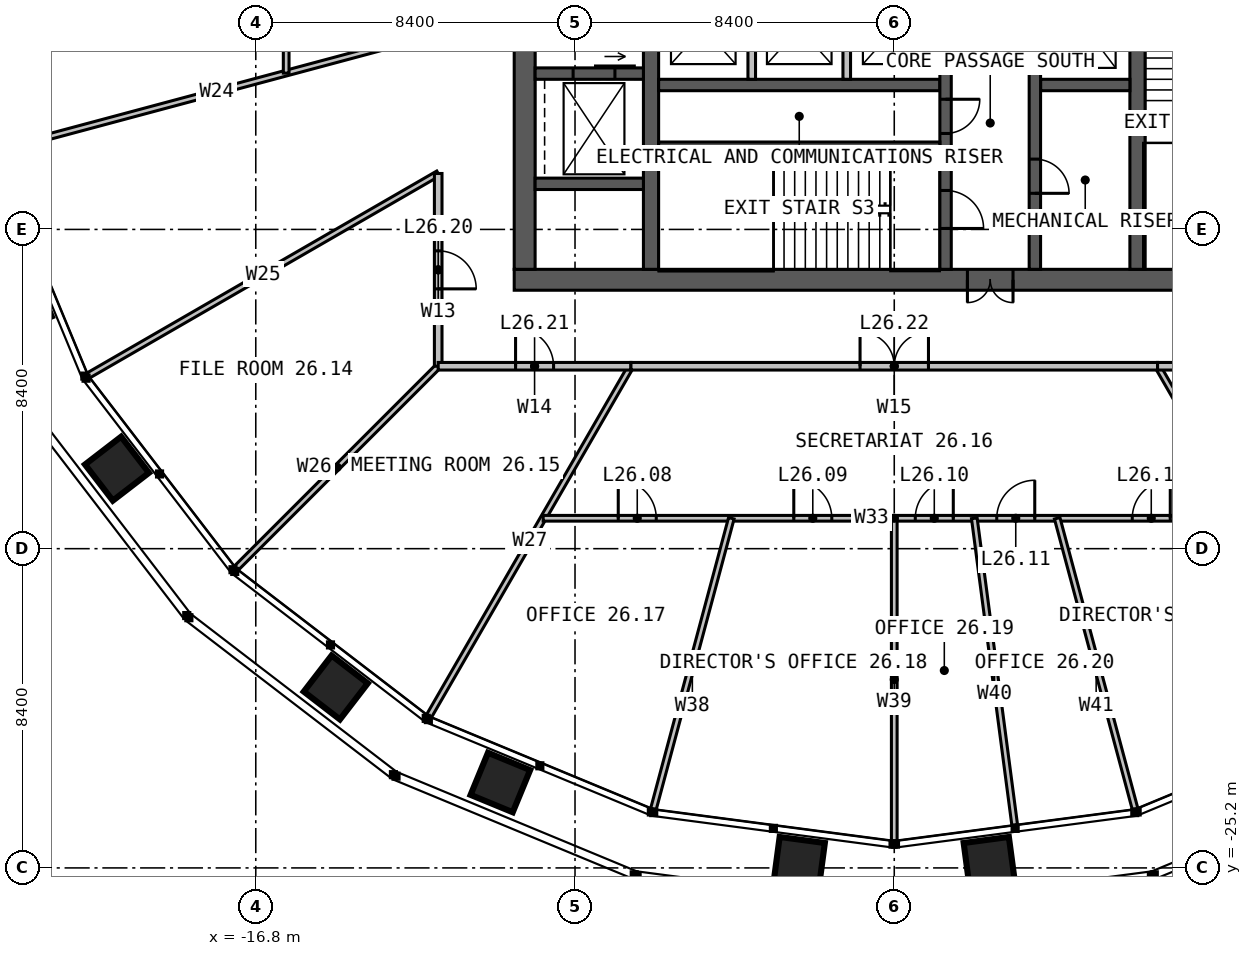
"""IFC4 building model, lengths in metres.
Left out: names, types, materials, properties, quantities, classifications, styles, units other than length and angle.
Written with IfcOpenShell. Run it as: python <this file> out.ifc"""

import sys

from ifc_helpers import new_model, si_unit, direction, frame, frame_2d, origin, place, context, subcontext, project, spatial, rectangle, extrude, element, fill, save


model = new_model("IFC4")
c1 = context("Model", 3, precision=1e-05, world=origin(), true_north=direction((0.0, 1.0)))
c2 = subcontext(c1, "Body", "Model", "MODEL_VIEW")
j1 = project(units=[si_unit("LENGTHUNIT", "METRE"), si_unit("PLANEANGLEUNIT", "RADIAN")], contexts=[c1])
p1 = place(None, origin())
s1 = spatial("IfcSite", under=j1, at=p1, CompositionType="ELEMENT")
p2 = place(p1, origin())
s2 = spatial("IfcBuilding", under=s1, at=p2, CompositionType="ELEMENT")
p3 = place(p2, frame((0.0, 0.0, 110.0)))
s3 = spatial("IfcBuildingStorey", under=s2, at=p3, CompositionType="ELEMENT", Elevation=110.0)
p4 = place(p3, frame((10.0, -9.725, 0.0), z_axis=(0.0, 0.0, 1.0), x_axis=(-1.0, 0.0, 0.0)))
e1 = element("IfcWall", 1, at=p4, inside=s3, PredefinedType="SOLIDWALL", context=c2, shape_type="SweptSolid", body=[
    extrude(rectangle(XDim=20.0, YDim=0.55, at=frame_2d((10.0, 0.0))), origin(), (0.0, 0.0, 1.0), 4.0),
])
p5 = place(p4, frame((6.875, 0.0, 0.0)))
e2 = element("IfcOpeningElement", 2, at=p5, cuts=e1, PredefinedType="OPENING", context=c2, shape_type="SweptSolid", body=[
    extrude(rectangle(XDim=1.2, YDim=2.2, at=frame_2d((0.6, 1.1))), frame((0.0, 0.285, 0.0), z_axis=(0.0, -1.0, 0.0), x_axis=(1.0, 0.0, 0.0)), (0.0, 0.0, 1.0), 0.57),
])
p6 = place(p3, frame((-9.725, 9.45, 0.0), z_axis=(0.0, 0.0, 1.0), x_axis=(0.0, -1.0, 0.0)))
e3 = element("IfcWall", 3, at=p6, inside=s3, PredefinedType="SOLIDWALL", context=c2, shape_type="SweptSolid", body=[
    extrude(rectangle(XDim=18.9, YDim=0.55, at=frame_2d((9.45, 0.0))), origin(), (0.0, 0.0, 1.0), 4.0),
])
p7 = place(p3, frame((-6.4, -9.45, 0.0), z_axis=(0.0, 0.0, 1.0), x_axis=(0.0, 1.0, 0.0)))
e4 = element("IfcWall", 4, at=p7, inside=s3, PredefinedType="SOLIDWALL", context=c2, shape_type="SweptSolid", body=[
    extrude(rectangle(XDim=18.9, YDim=0.4, at=frame_2d((9.45, 0.0))), origin(), (0.0, 0.0, 1.0), 4.0),
])
p8 = place(p7, frame((8.95, 0.0, 0.0)))
e5 = element("IfcOpeningElement", 5, at=p8, cuts=e4, PredefinedType="OPENING", context=c2, shape_type="SweptSolid", body=[
    extrude(rectangle(XDim=1.0, YDim=2.2, at=frame_2d((0.5, 1.1))), frame((0.0, 0.21, 0.0), z_axis=(0.0, -1.0, 0.0), x_axis=(1.0, 0.0, 0.0)), (0.0, 0.0, 1.0), 0.42),
])
p9 = place(p3, frame((6.4, 9.45, 0.0), z_axis=(0.0, 0.0, 1.0), x_axis=(0.0, -1.0, 0.0)))
e6 = element("IfcWall", 6, at=p9, inside=s3, PredefinedType="SOLIDWALL", context=c2, shape_type="SweptSolid", body=[
    extrude(rectangle(XDim=18.9, YDim=0.4, at=frame_2d((9.45, 0.0))), origin(), (0.0, 0.0, 1.0), 4.0),
])
p10 = place(p9, frame((8.95, 0.0, 0.0)))
e7 = element("IfcOpeningElement", 7, at=p10, cuts=e6, PredefinedType="OPENING", context=c2, shape_type="SweptSolid", body=[
    extrude(rectangle(XDim=1.0, YDim=2.2, at=frame_2d((0.5, 1.1))), frame((0.0, 0.21, 0.0), z_axis=(0.0, -1.0, 0.0), x_axis=(1.0, 0.0, 0.0)), (0.0, 0.0, 1.0), 0.42),
])
p11 = place(p3, frame((-6.2, -4.6, 0.0), z_axis=(0.0, 0.0, 1.0), x_axis=(1.0, 0.0, 0.0)))
e8 = element("IfcWall", 8, at=p11, inside=s3, PredefinedType="SOLIDWALL", context=c2, shape_type="SweptSolid", body=[
    extrude(rectangle(XDim=7.4, YDim=0.3, at=frame_2d((3.7, 0.0))), origin(), (0.0, 0.0, 1.0), 4.0),
])
p12 = place(p3, frame((3.85, -4.6, 0.0), z_axis=(0.0, 0.0, 1.0), x_axis=(1.0, 0.0, 0.0)))
e9 = element("IfcWall", 9, at=p12, inside=s3, PredefinedType="SOLIDWALL", context=c2, shape_type="SweptSolid", body=[
    extrude(rectangle(XDim=2.35, YDim=0.3, at=frame_2d((1.175, 0.0))), origin(), (0.0, 0.0, 1.0), 4.0),
])
p13 = place(p3, frame((1.35, -1.45, 0.0), z_axis=(0.0, 0.0, 1.0), x_axis=(0.0, -1.0, 0.0)))
e10 = element("IfcWall", 10, at=p13, inside=s3, PredefinedType="SOLIDWALL", context=c2, shape_type="SweptSolid", body=[
    extrude(rectangle(XDim=8.0, YDim=0.3, at=frame_2d((4.0, 0.0))), origin(), (0.0, 0.0, 1.0), 4.0),
])
p14 = place(p13, frame((5.925, 0.0, 0.0)))
e11 = element("IfcOpeningElement", 11, at=p14, cuts=e10, PredefinedType="OPENING", context=c2, shape_type="SweptSolid", body=[
    extrude(rectangle(XDim=1.0, YDim=2.2, at=frame_2d((0.5, 1.1))), frame((0.0, 0.16, 0.0), z_axis=(0.0, -1.0, 0.0), x_axis=(1.0, 0.0, 0.0)), (0.0, 0.0, 1.0), 0.32),
])
p15 = place(p13, frame((3.525, 0.0, 0.0)))
e12 = element("IfcOpeningElement", 12, at=p15, cuts=e10, PredefinedType="OPENING", context=c2, shape_type="SweptSolid", body=[
    extrude(rectangle(XDim=0.9, YDim=2.2, at=frame_2d((0.45, 1.1))), frame((0.0, 0.16, 0.0), z_axis=(0.0, -1.0, 0.0), x_axis=(1.0, 0.0, 0.0)), (0.0, 0.0, 1.0), 0.32),
])
p16 = place(p3, frame((3.7, -1.45, 0.0), z_axis=(0.0, 0.0, 1.0), x_axis=(0.0, -1.0, 0.0)))
e13 = element("IfcWall", 13, at=p16, inside=s3, PredefinedType="SOLIDWALL", context=c2, shape_type="SweptSolid", body=[
    extrude(rectangle(XDim=8.0, YDim=0.3, at=frame_2d((4.0, 0.0))), origin(), (0.0, 0.0, 1.0), 4.0),
])
p17 = place(p16, frame((5.1, 0.0, 0.0)))
e14 = element("IfcOpeningElement", 14, at=p17, cuts=e13, PredefinedType="OPENING", context=c2, shape_type="SweptSolid", body=[
    extrude(rectangle(XDim=0.9, YDim=2.2, at=frame_2d((0.45, 1.1))), frame((0.0, 0.16, 0.0), z_axis=(0.0, -1.0, 0.0), x_axis=(1.0, 0.0, 0.0)), (0.0, 0.0, 1.0), 0.32),
])
p18 = place(p3, frame((-6.2, -6.2, 0.0), z_axis=(0.0, 0.0, 1.0), x_axis=(1.0, 0.0, 0.0)))
e15 = element("IfcWall", 15, at=p18, inside=s3, PredefinedType="SOLIDWALL", context=c2, shape_type="SweptSolid", body=[
    extrude(rectangle(XDim=7.4, YDim=0.2, at=frame_2d((3.7, 0.0))), origin(), (0.0, 0.0, 1.0), 4.0),
])
p19 = place(p3, frame((-9.45, -4.3, 0.0), z_axis=(0.0, 0.0, 1.0), x_axis=(1.0, 0.0, 0.0)))
e16 = element("IfcWall", 16, at=p19, inside=s3, PredefinedType="SOLIDWALL", context=c2, shape_type="SweptSolid", body=[
    extrude(rectangle(XDim=2.85, YDim=0.3, at=frame_2d((1.425, 0.0))), origin(), (0.0, 0.0, 1.0), 4.0),
])
p20 = place(p19, frame((1.0, 0.0, 0.0)))
e17 = element("IfcOpeningElement", 17, at=p20, cuts=e16, PredefinedType="OPENING", context=c2, shape_type="SweptSolid", body=[
    extrude(rectangle(XDim=1.1, YDim=2.2, at=frame_2d((0.55, 1.1))), frame((0.0, 0.16, 0.0), z_axis=(0.0, -1.0, 0.0), x_axis=(1.0, 0.0, 0.0)), (0.0, 0.0, 1.0), 0.32),
])
p21 = place(p3, frame((-9.45, -7.2, 0.0), z_axis=(0.0, 0.0, 1.0), x_axis=(1.0, 0.0, 0.0)))
e18 = element("IfcWall", 18, at=p21, inside=s3, PredefinedType="SOLIDWALL", context=c2, shape_type="SweptSolid", body=[
    extrude(rectangle(XDim=2.85, YDim=0.3, at=frame_2d((1.425, 0.0))), origin(), (0.0, 0.0, 1.0), 4.0),
])
for number, where, z_axis, x_axis in (
    (19, (-3.75, -1.75, 0.0), (0.0, 0.0, 1.0), (0.0, -1.0, 0.0)),
    (20, (-1.25, -1.75, 0.0), (0.0, 0.0, 1.0), (0.0, -1.0, 0.0)),
):
    element("IfcWall", number, at=place(p3, frame(where, z_axis=z_axis, x_axis=x_axis)), inside=s3, PredefinedType="SOLIDWALL", context=c2, shape_type="SweptSolid", body=[
        extrude(rectangle(XDim=2.7, YDim=0.2, at=frame_2d((1.35, 0.0))), origin(), (0.0, 0.0, 1.0), 3.75),
    ])
p22 = place(p3, frame((-12.0, -3.215, 0.0), z_axis=(0.0, 0.0, 1.0), x_axis=(-0.965926913807, -0.258814986396, 0.0)))
e21 = element("IfcWall", 21, at=p22, inside=s3, PredefinedType="PARTITIONING", context=c2, shape_type="SweptSolid", body=[
    extrude(rectangle(XDim=12.064, YDim=0.15, at=frame_2d((6.032, 0.0))), origin(), (0.0, 0.0, 1.0), 2.79),
])
p23 = place(p3, frame((-12.0, -6.928, 0.0), z_axis=(0.0, 0.0, 1.0), x_axis=(-0.866024197053, -0.500002090115, 0.0)))
e22 = element("IfcWall", 22, at=p23, inside=s3, PredefinedType="PARTITIONING", context=c2, shape_type="SweptSolid", body=[
    extrude(rectangle(XDim=10.631, YDim=0.15, at=frame_2d((5.315, 0.0))), origin(), (0.0, 0.0, 1.0), 2.79),
])
p24 = place(p3, frame((-12.0, -12.0, 0.0), z_axis=(0.0, 0.0, 1.0), x_axis=(-0.707106781187, -0.707106781187, 0.0)))
e23 = element("IfcWall", 23, at=p24, inside=s3, PredefinedType="PARTITIONING", context=c2, shape_type="SweptSolid", body=[
    extrude(rectangle(XDim=7.517, YDim=0.15, at=frame_2d((3.758, 0.0))), origin(), (0.0, 0.0, 1.0), 2.79),
])
for number, where, z_axis, x_axis in (
    (24, (-6.928, -12.0, 0.0), (0.0, 0.0, 1.0), (-0.5, -0.866, 0.0)),
    (25, (6.928, -12.0, 0.0), (0.0, 0.0, 1.0), (0.5, -0.866, 0.0)),
):
    element("IfcWall", number, at=place(p3, frame(where, z_axis=z_axis, x_axis=x_axis)), inside=s3, PredefinedType="PARTITIONING", context=c2, shape_type="SweptSolid", body=[
        extrude(rectangle(XDim=10.631, YDim=0.15, at=frame_2d((5.315, 0.0))), origin(), (0.0, 0.0, 1.0), 2.79),
    ])
p25 = place(p3, frame((-16.0, 9.238, 0.0), z_axis=(0.0, 0.0, 1.0), x_axis=(0.0, -1.0, 0.0)))
e26 = element("IfcWall", 26, at=p25, inside=s3, PredefinedType="PARTITIONING", context=c2, shape_type="SweptSolid", body=[
    extrude(rectangle(XDim=13.525, YDim=0.15, at=frame_2d((6.762, 0.0))), origin(), (0.0, 0.0, 1.0), 2.79),
])
p26 = place(p25, frame((1.975, 0.0, 0.0)))
e27 = element("IfcOpeningElement", 27, at=p26, cuts=e26, PredefinedType="OPENING", context=c2, shape_type="SweptSolid", body=[
    extrude(rectangle(XDim=1.0, YDim=2.2, at=frame_2d((0.5, 1.1))), frame((0.0, 0.085, 0.0), z_axis=(0.0, -1.0, 0.0), x_axis=(1.0, 0.0, 0.0)), (0.0, 0.0, 1.0), 0.17),
])
p27 = place(p25, frame((6.594, 0.0, 0.0)))
e28 = element("IfcOpeningElement", 28, at=p27, cuts=e26, PredefinedType="OPENING", context=c2, shape_type="SweptSolid", body=[
    extrude(rectangle(XDim=1.0, YDim=2.2, at=frame_2d((0.5, 1.1))), frame((0.0, 0.085, 0.0), z_axis=(0.0, -1.0, 0.0), x_axis=(1.0, 0.0, 0.0)), (0.0, 0.0, 1.0), 0.17),
])
p28 = place(p25, frame((10.881, 0.0, 0.0)))
e29 = element("IfcOpeningElement", 29, at=p28, cuts=e26, PredefinedType="OPENING", context=c2, shape_type="SweptSolid", body=[
    extrude(rectangle(XDim=1.0, YDim=2.2, at=frame_2d((0.5, 1.1))), frame((0.0, 0.085, 0.0), z_axis=(0.0, -1.0, 0.0), x_axis=(1.0, 0.0, 0.0)), (0.0, 0.0, 1.0), 0.17),
])
p29 = place(p3, frame((-12.0, -6.928, 0.0), z_axis=(0.0, 0.0, 1.0), x_axis=(0.0, -1.0, 0.0)))
e30 = element("IfcWall", 30, at=p29, inside=s3, PredefinedType="PARTITIONING", context=c2, shape_type="SweptSolid", body=[
    extrude(rectangle(XDim=5.072, YDim=0.2, at=frame_2d((2.536, 0.0))), origin(), (0.0, 0.0, 1.0), 3.8),
])
p30 = place(p29, frame((2.036, 0.0, 0.0)))
e31 = element("IfcOpeningElement", 31, at=p30, cuts=e30, PredefinedType="OPENING", context=c2, shape_type="SweptSolid", body=[
    extrude(rectangle(XDim=1.0, YDim=2.2, at=frame_2d((0.5, 1.1))), frame((0.0, 0.11, 0.0), z_axis=(0.0, -1.0, 0.0), x_axis=(1.0, 0.0, 0.0)), (0.0, 0.0, 1.0), 0.22),
])
p31 = place(p3, frame((-12.0, -12.0, 0.0), z_axis=(0.0, 0.0, 1.0), x_axis=(1.0, 0.0, 0.0)))
e32 = element("IfcWall", 32, at=p31, inside=s3, PredefinedType="PARTITIONING", context=c2, shape_type="SweptSolid", body=[
    extrude(rectangle(XDim=5.072, YDim=0.2, at=frame_2d((2.536, 0.0))), origin(), (0.0, 0.0, 1.0), 3.8),
])
p32 = place(p31, frame((2.036, 0.0, 0.0)))
e33 = element("IfcOpeningElement", 33, at=p32, cuts=e32, PredefinedType="OPENING", context=c2, shape_type="SweptSolid", body=[
    extrude(rectangle(XDim=1.0, YDim=2.2, at=frame_2d((0.5, 1.1))), frame((0.0, 0.11, 0.0), z_axis=(0.0, -1.0, 0.0), x_axis=(1.0, 0.0, 0.0)), (0.0, 0.0, 1.0), 0.22),
])
p33 = place(p3, frame((-9.238, -16.0, 0.0), z_axis=(0.0, 0.0, 1.0), x_axis=(1.0, 0.0, 0.0)))
e34 = element("IfcWall", 34, at=p33, inside=s3, PredefinedType="PARTITIONING", context=c2, shape_type="SweptSolid", body=[
    extrude(rectangle(XDim=18.475, YDim=0.15, at=frame_2d((9.238, 0.0))), origin(), (0.0, 0.0, 1.0), 2.79),
])
p34 = place(p33, frame((1.975, 0.0, 0.0)))
e35 = element("IfcOpeningElement", 35, at=p34, cuts=e34, PredefinedType="OPENING", context=c2, shape_type="SweptSolid", body=[
    extrude(rectangle(XDim=1.0, YDim=2.2, at=frame_2d((0.5, 1.1))), frame((0.0, 0.085, 0.0), z_axis=(0.0, -1.0, 0.0), x_axis=(1.0, 0.0, 0.0)), (0.0, 0.0, 1.0), 0.17),
])
p35 = place(p33, frame((6.594, 0.0, 0.0)))
e36 = element("IfcOpeningElement", 36, at=p35, cuts=e34, PredefinedType="OPENING", context=c2, shape_type="SweptSolid", body=[
    extrude(rectangle(XDim=1.0, YDim=2.2, at=frame_2d((0.5, 1.1))), frame((0.0, 0.085, 0.0), z_axis=(0.0, -1.0, 0.0), x_axis=(1.0, 0.0, 0.0)), (0.0, 0.0, 1.0), 0.17),
])
p36 = place(p33, frame((9.791, 0.0, 0.0)))
e37 = element("IfcOpeningElement", 37, at=p36, cuts=e34, PredefinedType="OPENING", context=c2, shape_type="SweptSolid", body=[
    extrude(rectangle(XDim=1.0, YDim=2.2, at=frame_2d((0.5, 1.1))), frame((0.0, 0.085, 0.0), z_axis=(0.0, -1.0, 0.0), x_axis=(1.0, 0.0, 0.0)), (0.0, 0.0, 1.0), 0.17),
])
p37 = place(p33, frame((11.934, 0.0, 0.0)))
e38 = element("IfcOpeningElement", 38, at=p37, cuts=e34, PredefinedType="OPENING", context=c2, shape_type="SweptSolid", body=[
    extrude(rectangle(XDim=1.0, YDim=2.2, at=frame_2d((0.5, 1.1))), frame((0.0, 0.085, 0.0), z_axis=(0.0, -1.0, 0.0), x_axis=(1.0, 0.0, 0.0)), (0.0, 0.0, 1.0), 0.17),
])
p38 = place(p33, frame((15.5, 0.0, 0.0)))
e39 = element("IfcOpeningElement", 39, at=p38, cuts=e34, PredefinedType="OPENING", context=c2, shape_type="SweptSolid", body=[
    extrude(rectangle(XDim=1.0, YDim=2.2, at=frame_2d((0.5, 1.1))), frame((0.0, 0.085, 0.0), z_axis=(0.0, -1.0, 0.0), x_axis=(1.0, 0.0, 0.0)), (0.0, 0.0, 1.0), 0.17),
])
p39 = place(p3, frame((-4.287, -16.0, 0.0), z_axis=(0.0, 0.0, 1.0), x_axis=(-0.258815152648, -0.965926869261, 0.0)))
e40 = element("IfcWall", 40, at=p39, inside=s3, PredefinedType="PARTITIONING", context=c2, shape_type="SweptSolid", body=[
    extrude(rectangle(XDim=7.923, YDim=0.15, at=frame_2d((3.961, 0.0))), origin(), (0.0, 0.0, 1.0), 2.79),
])
p40 = place(p3, frame((0.0, -16.0, 0.0), z_axis=(0.0, 0.0, 1.0), x_axis=(0.0, -1.0, 0.0)))
e41 = element("IfcWall", 41, at=p40, inside=s3, PredefinedType="PARTITIONING", context=c2, shape_type="SweptSolid", body=[
    extrude(rectangle(XDim=8.487, YDim=0.15, at=frame_2d((4.244, 0.0))), origin(), (0.0, 0.0, 1.0), 2.79),
])
p41 = place(p3, frame((2.106, -16.0, 0.0), z_axis=(0.0, 0.0, 1.0), x_axis=(0.13053287573, -0.99144398145, 0.0)))
e42 = element("IfcWall", 42, at=p41, inside=s3, PredefinedType="PARTITIONING", context=c2, shape_type="SweptSolid", body=[
    extrude(rectangle(XDim=8.14, YDim=0.15, at=frame_2d((4.07, 0.0))), origin(), (0.0, 0.0, 1.0), 2.79),
])
p42 = place(p3, frame((4.287, -16.0, 0.0), z_axis=(0.0, 0.0, 1.0), x_axis=(0.258815152648, -0.965926869261, 0.0)))
e43 = element("IfcWall", 43, at=p42, inside=s3, PredefinedType="PARTITIONING", context=c2, shape_type="SweptSolid", body=[
    extrude(rectangle(XDim=7.923, YDim=0.15, at=frame_2d((3.961, 0.0))), origin(), (0.0, 0.0, 1.0), 2.79),
])
p43 = place(p3, frame((-6.928, -12.0, 0.0), z_axis=(0.0, 0.0, 1.0), x_axis=(1.0, 0.0, 0.0)))
e44 = element("IfcWall", 44, at=p43, inside=s3, PredefinedType="PARTITIONING", context=c2, shape_type="SweptSolid", body=[
    extrude(rectangle(XDim=13.856, YDim=0.2, at=frame_2d((6.928, 0.0))), origin(), (0.0, 0.0, 1.0), 3.8),
])
p44 = place(p43, frame((6.028, 0.0, 0.0)))
e45 = element("IfcOpeningElement", 45, at=p44, cuts=e44, PredefinedType="OPENING", context=c2, shape_type="SweptSolid", body=[
    extrude(rectangle(XDim=1.8, YDim=2.2, at=frame_2d((0.9, 1.1))), frame((0.0, 0.11, 0.0), z_axis=(0.0, -1.0, 0.0), x_axis=(1.0, 0.0, 0.0)), (0.0, 0.0, 1.0), 0.22),
])
p45 = place(p3, frame((6.928, -12.0, 0.0), z_axis=(0.0, 0.0, 1.0), x_axis=(1.0, 0.0, 0.0)))
e46 = element("IfcWall", 46, at=p45, inside=s3, PredefinedType="PARTITIONING", context=c2, shape_type="SweptSolid", body=[
    extrude(rectangle(XDim=5.072, YDim=0.2, at=frame_2d((2.536, 0.0))), origin(), (0.0, 0.0, 1.0), 3.8),
])
p46 = place(p45, frame((2.036, 0.0, 0.0)))
e47 = element("IfcOpeningElement", 47, at=p46, cuts=e46, PredefinedType="OPENING", context=c2, shape_type="SweptSolid", body=[
    extrude(rectangle(XDim=1.0, YDim=2.2, at=frame_2d((0.5, 1.1))), frame((0.0, 0.11, 0.0), z_axis=(0.0, -1.0, 0.0), x_axis=(1.0, 0.0, 0.0)), (0.0, 0.0, 1.0), 0.22),
])
p47 = place(p5, origin())
e48 = element("IfcDoor", 48, at=p47, inside=s3, OperationType="DOUBLE_DOOR_SINGLE_SWING", PredefinedType="DOOR", context=c2, shape_type="SweptSolid", body=[
    extrude(rectangle(XDim=1.2, YDim=2.2, at=frame_2d((0.6, 1.1))), frame((0.0, 0.025, 0.0), z_axis=(0.0, -1.0, 0.0), x_axis=(1.0, 0.0, 0.0)), (0.0, 0.0, 1.0), 0.05),
])
fill(e2, e48)
p48 = place(p14, origin())
e49 = element("IfcDoor", 49, at=p48, inside=s3, OperationType="SINGLE_SWING_RIGHT", PredefinedType="DOOR", context=c2, shape_type="SweptSolid", body=[
    extrude(rectangle(XDim=1.0, YDim=2.2, at=frame_2d((0.5, 1.1))), frame((0.0, 0.025, 0.0), z_axis=(0.0, -1.0, 0.0), x_axis=(1.0, 0.0, 0.0)), (0.0, 0.0, 1.0), 0.05),
])
fill(e11, e49)
p49 = place(p15, origin())
e50 = element("IfcDoor", 50, at=p49, inside=s3, OperationType="SINGLE_SWING_LEFT", PredefinedType="DOOR", context=c2, shape_type="SweptSolid", body=[
    extrude(rectangle(XDim=0.9, YDim=2.2, at=frame_2d((0.45, 1.1))), frame((0.0, 0.025, 0.0), z_axis=(0.0, -1.0, 0.0), x_axis=(1.0, 0.0, 0.0)), (0.0, 0.0, 1.0), 0.05),
])
fill(e12, e50)
p50 = place(p17, origin())
e51 = element("IfcDoor", 51, at=p50, inside=s3, OperationType="SINGLE_SWING_RIGHT", PredefinedType="DOOR", context=c2, shape_type="SweptSolid", body=[
    extrude(rectangle(XDim=0.9, YDim=2.2, at=frame_2d((0.45, 1.1))), frame((0.0, 0.025, 0.0), z_axis=(0.0, -1.0, 0.0), x_axis=(1.0, 0.0, 0.0)), (0.0, 0.0, 1.0), 0.05),
])
fill(e14, e51)
p51 = place(p20, origin())
e52 = element("IfcDoor", 52, at=p51, inside=s3, OperationType="SLIDING_TO_LEFT", PredefinedType="DOOR", context=c2, shape_type="SweptSolid", body=[
    extrude(rectangle(XDim=1.1, YDim=2.2, at=frame_2d((0.55, 1.1))), frame((0.0, 0.025, 0.0), z_axis=(0.0, -1.0, 0.0), x_axis=(1.0, 0.0, 0.0)), (0.0, 0.0, 1.0), 0.05),
])
fill(e17, e52)
p52 = place(p30, origin())
e53 = element("IfcDoor", 53, at=p52, inside=s3, OperationType="SINGLE_SWING_RIGHT", PredefinedType="DOOR", context=c2, shape_type="SweptSolid", body=[
    extrude(rectangle(XDim=1.0, YDim=2.2, at=frame_2d((0.5, 1.1))), frame((0.0, 0.025, 0.0), z_axis=(0.0, -1.0, 0.0), x_axis=(1.0, 0.0, 0.0)), (0.0, 0.0, 1.0), 0.05),
])
fill(e31, e53)
p53 = place(p32, origin())
e54 = element("IfcDoor", 54, at=p53, inside=s3, OperationType="SINGLE_SWING_LEFT", PredefinedType="DOOR", context=c2, shape_type="SweptSolid", body=[
    extrude(rectangle(XDim=1.0, YDim=2.2, at=frame_2d((0.5, 1.1))), frame((0.0, 0.025, 0.0), z_axis=(0.0, -1.0, 0.0), x_axis=(1.0, 0.0, 0.0)), (0.0, 0.0, 1.0), 0.05),
])
fill(e33, e54)
p54 = place(p34, origin())
e55 = element("IfcDoor", 55, at=p54, inside=s3, OperationType="SINGLE_SWING_LEFT", PredefinedType="DOOR", context=c2, shape_type="SweptSolid", body=[
    extrude(rectangle(XDim=1.0, YDim=2.2, at=frame_2d((0.5, 1.1))), frame((0.0, 0.025, 0.0), z_axis=(0.0, -1.0, 0.0), x_axis=(1.0, 0.0, 0.0)), (0.0, 0.0, 1.0), 0.05),
])
fill(e35, e55)
p55 = place(p35, origin())
e56 = element("IfcDoor", 56, at=p55, inside=s3, OperationType="SINGLE_SWING_LEFT", PredefinedType="DOOR", context=c2, shape_type="SweptSolid", body=[
    extrude(rectangle(XDim=1.0, YDim=2.2, at=frame_2d((0.5, 1.1))), frame((0.0, 0.025, 0.0), z_axis=(0.0, -1.0, 0.0), x_axis=(1.0, 0.0, 0.0)), (0.0, 0.0, 1.0), 0.05),
])
fill(e36, e56)
p56 = place(p36, origin())
e57 = element("IfcDoor", 57, at=p56, inside=s3, OperationType="SINGLE_SWING_RIGHT", PredefinedType="DOOR", context=c2, shape_type="SweptSolid", body=[
    extrude(rectangle(XDim=1.0, YDim=2.2, at=frame_2d((0.5, 1.1))), frame((0.0, 0.025, 0.0), z_axis=(0.0, -1.0, 0.0), x_axis=(1.0, 0.0, 0.0)), (0.0, 0.0, 1.0), 0.05),
])
fill(e37, e57)
p57 = place(p37, origin())
e58 = element("IfcDoor", 58, at=p57, inside=s3, OperationType="SINGLE_SWING_RIGHT", PredefinedType="DOOR", context=c2, shape_type="SweptSolid", body=[
    extrude(rectangle(XDim=1.0, YDim=2.2, at=frame_2d((0.5, 1.1))), frame((0.0, 0.025, 0.0), z_axis=(0.0, -1.0, 0.0), x_axis=(1.0, 0.0, 0.0)), (0.0, 0.0, 1.0), 0.05),
])
fill(e38, e58)
p58 = place(p38, origin())
e59 = element("IfcDoor", 59, at=p58, inside=s3, OperationType="SINGLE_SWING_RIGHT", PredefinedType="DOOR", context=c2, shape_type="SweptSolid", body=[
    extrude(rectangle(XDim=1.0, YDim=2.2, at=frame_2d((0.5, 1.1))), frame((0.0, 0.025, 0.0), z_axis=(0.0, -1.0, 0.0), x_axis=(1.0, 0.0, 0.0)), (0.0, 0.0, 1.0), 0.05),
])
fill(e39, e59)
p59 = place(p44, origin())
e60 = element("IfcDoor", 60, at=p59, inside=s3, OperationType="DOUBLE_DOOR_SINGLE_SWING", PredefinedType="DOOR", context=c2, shape_type="SweptSolid", body=[
    extrude(rectangle(XDim=1.8, YDim=2.2, at=frame_2d((0.9, 1.1))), frame((0.0, 0.025, 0.0), z_axis=(0.0, -1.0, 0.0), x_axis=(1.0, 0.0, 0.0)), (0.0, 0.0, 1.0), 0.05),
])
fill(e45, e60)
save(model, sys.argv[1])
